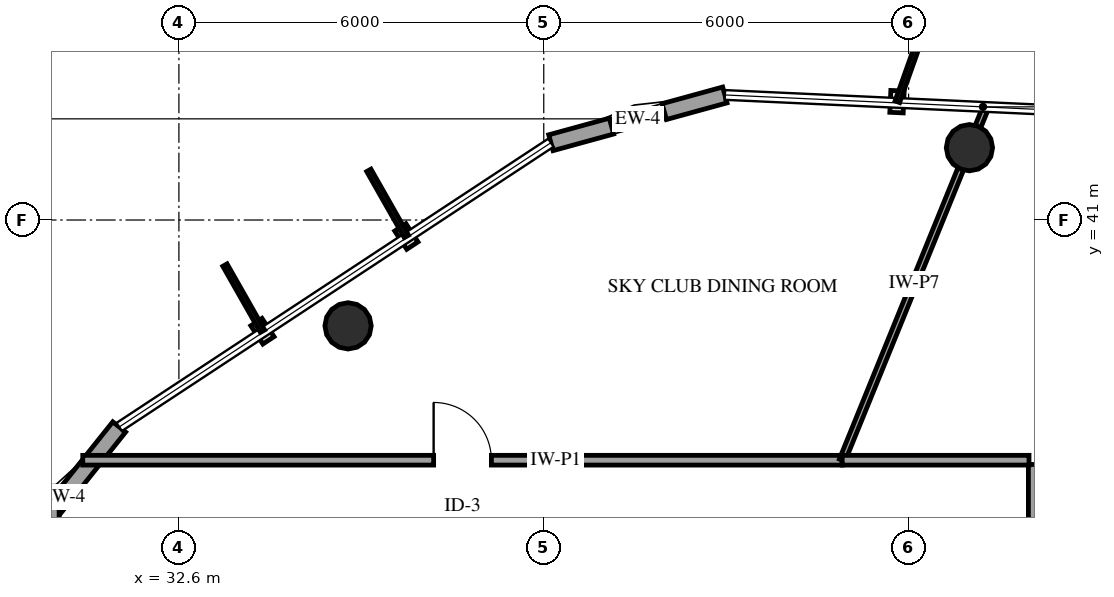
"""IFC4 building model, lengths in metres.
Left out: names, types, materials, properties, quantities, classifications, styles, units other than length and angle.
Written with IfcOpenShell. Run it as: python <this file> out.ifc"""

import sys

from ifc_helpers import new_model, si_unit, direction, frame, frame_2d, origin, origin_2d, place, context, subcontext, project, spatial, rectangle, hollow_circle, extrude, element, fill, save


model = new_model("IFC4")
c1 = context("Model", 3, precision=1e-05, world=origin(), true_north=direction((0.0, 1.0)))
c2 = subcontext(c1, "Body", "Model", "MODEL_VIEW")
j1 = project(units=[si_unit("LENGTHUNIT", "METRE"), si_unit("PLANEANGLEUNIT", "RADIAN")], contexts=[c1])
p1 = place(None, origin())
s1 = spatial("IfcSite", under=j1, at=p1, CompositionType="ELEMENT")
p2 = place(p1, origin())
s2 = spatial("IfcBuilding", under=s1, at=p2, CompositionType="ELEMENT")
p3 = place(p2, frame((0.0, 0.0, 288.55)))
s3 = spatial("IfcBuildingStorey", under=s2, at=p3, CompositionType="ELEMENT", Elevation=288.55)
for number, where, z_axis, x_axis in (
    (1, (45.6, 42.189, 0.0), (0.0, 0.0, 1.0), (1.0, 0.0, 0.0)),
    (2, (35.382, 39.26, 0.0), (0.0, 0.0, 1.0), (1.0, 0.0, 0.0)),
):
    element("IfcColumn", number, at=place(p3, frame(where, z_axis=z_axis, x_axis=x_axis)), inside=s3, PredefinedType="COLUMN", context=c2, shape_type="SweptSolid", body=[
        extrude(hollow_circle(Radius=0.381, WallThickness=0.025, at=origin_2d()), origin(), (0.0, 0.0, 1.0), 4.165),
    ])
p4 = place(p3, frame((41.578, 43.057, 0.0), z_axis=(0.0, 0.0, 1.0), x_axis=(-0.964272165629, -0.264913553056, 0.0)))
e3 = element("IfcWall", 3, at=p4, inside=s3, PredefinedType="SOLIDWALL", context=c2, shape_type="SweptSolid", body=[
    extrude(rectangle(XDim=2.967, YDim=0.27, at=frame_2d((1.483, 0.0))), origin(), (0.0, 0.0, 1.0), 3.574),
])
p5 = place(p4, frame((1.033, 0.0, 0.75)))
e4 = element("IfcOpeningElement", 4, at=p5, cuts=e3, PredefinedType="OPENING", context=c2, shape_type="SweptSolid", body=[
    extrude(rectangle(XDim=0.9, YDim=1.5, at=frame_2d((0.45, 0.75))), frame((0.0, 0.145, 0.0), z_axis=(0.0, -1.0, 0.0), x_axis=(1.0, 0.0, 0.0)), (0.0, 0.0, 1.0), 0.29),
])
p6 = place(p3, frame((31.618, 37.597, 0.0), z_axis=(0.0, 0.0, 1.0), x_axis=(-0.624444087009, -0.781069511759, 0.0)))
e5 = element("IfcWall", 5, at=p6, inside=s3, PredefinedType="SOLIDWALL", context=c2, shape_type="SweptSolid", body=[
    extrude(rectangle(XDim=2.966, YDim=0.27, at=frame_2d((1.483, 0.0))), origin(), (0.0, 0.0, 1.0), 3.574),
])
p7 = place(p3, frame((30.55, 15.07, 0.0), z_axis=(0.0, 0.0, 1.0), x_axis=(0.0, 1.0, 0.0)))
e6 = element("IfcWall", 6, at=p7, inside=s3, PredefinedType="PARTITIONING", context=c2, shape_type="SweptSolid", body=[
    extrude(rectangle(XDim=21.553, YDim=0.16, at=frame_2d((10.776, 0.0))), origin(), (0.0, 0.0, 1.0), 2.583),
])
p8 = place(p7, frame((10.301, 0.0, 0.0)))
e7 = element("IfcOpeningElement", 7, at=p8, cuts=e6, PredefinedType="OPENING", context=c2, shape_type="SweptSolid", body=[
    extrude(rectangle(XDim=0.95, YDim=2.15, at=frame_2d((0.475, 1.075))), frame((0.0, 0.09, 0.0), z_axis=(0.0, -1.0, 0.0), x_axis=(1.0, 0.0, 0.0)), (0.0, 0.0, 1.0), 0.18),
])
p9 = place(p3, frame((31.019, 37.05, 0.0), z_axis=(0.0, 0.0, 1.0), x_axis=(1.0, 0.0, 0.0)))
e8 = element("IfcWall", 8, at=p9, inside=s3, PredefinedType="PARTITIONING", context=c2, shape_type="SweptSolid", body=[
    extrude(rectangle(XDim=12.489, YDim=0.16, at=frame_2d((6.245, 0.0))), origin(), (0.0, 0.0, 1.0), 4.195),
])
p10 = place(p9, frame((5.77, 0.0, 0.0)))
e9 = element("IfcOpeningElement", 9, at=p10, cuts=e8, PredefinedType="OPENING", context=c2, shape_type="SweptSolid", body=[
    extrude(rectangle(XDim=0.95, YDim=2.15, at=frame_2d((0.475, 1.075))), frame((0.0, 0.09, 0.0), z_axis=(0.0, -1.0, 0.0), x_axis=(1.0, 0.0, 0.0)), (0.0, 0.0, 1.0), 0.18),
])
p11 = place(p3, frame((43.508, 37.05, 0.0), z_axis=(0.0, 0.0, 1.0), x_axis=(0.37694814958, 0.926234361557, 0.0)))
e10 = element("IfcWall", 10, at=p11, inside=s3, PredefinedType="PARTITIONING", context=c2, shape_type="SweptSolid", body=[
    extrude(rectangle(XDim=6.271, YDim=0.1, at=frame_2d((3.136, 0.0))), origin(), (0.0, 0.0, 1.0), 2.485),
])
p12 = place(p3, frame((46.65, 36.98, 0.0), z_axis=(0.0, 0.0, 1.0), x_axis=(0.0, -1.0, 0.0)))
e11 = element("IfcWall", 11, at=p12, inside=s3, PredefinedType="PARTITIONING", context=c2, shape_type="SweptSolid", body=[
    extrude(rectangle(XDim=3.41, YDim=0.16, at=frame_2d((1.705, 0.0))), origin(), (0.0, 0.0, 1.0), 4.195),
])
p13 = place(p3, frame((43.508, 37.05, 0.0), z_axis=(0.0, 0.0, 1.0), x_axis=(1.0, 0.0, 0.0)))
e12 = element("IfcWall", 12, at=p13, inside=s3, PredefinedType="PARTITIONING", context=c2, shape_type="SweptSolid", body=[
    extrude(rectangle(XDim=3.072, YDim=0.16, at=frame_2d((1.536, 0.0))), origin(), (0.0, 0.0, 1.0), 4.195),
])
p14 = place(p5, origin())
e13 = element("IfcWindow", 13, at=p14, inside=s3, PartitioningType="SINGLE_PANEL", PredefinedType="WINDOW", context=c2, shape_type="SweptSolid", body=[
    extrude(rectangle(XDim=0.9, YDim=1.5, at=frame_2d((0.45, 0.75))), frame((0.0, 0.03, 0.0), z_axis=(0.0, -1.0, 0.0), x_axis=(1.0, 0.0, 0.0)), (0.0, 0.0, 1.0), 0.06),
])
fill(e4, e13)
p15 = place(p10, origin())
e14 = element("IfcDoor", 14, at=p15, inside=s3, OperationType="SINGLE_SWING_LEFT", PredefinedType="DOOR", context=c2, shape_type="SweptSolid", body=[
    extrude(rectangle(XDim=0.95, YDim=2.15, at=frame_2d((0.475, 1.075))), frame((0.0, 0.025, 0.0), z_axis=(0.0, -1.0, 0.0), x_axis=(1.0, 0.0, 0.0)), (0.0, 0.0, 1.0), 0.05),
])
fill(e9, e14)
save(model, sys.argv[1])
